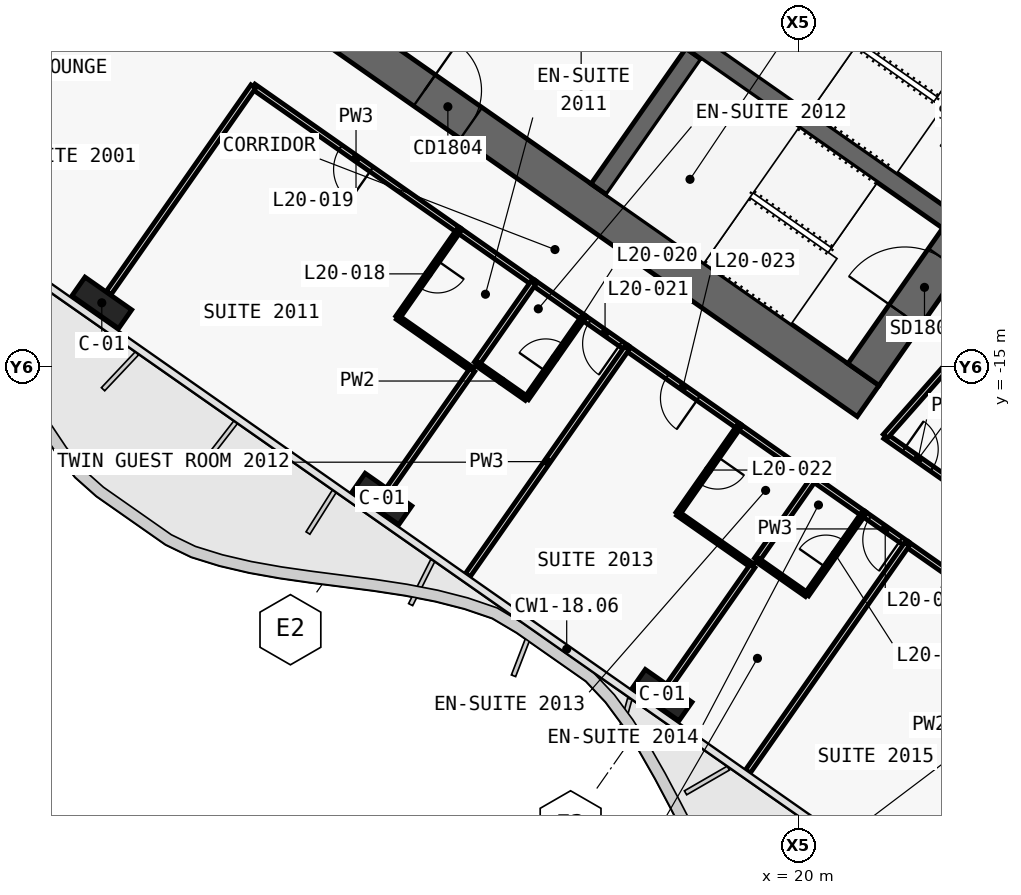
"""IFC4 building model, lengths in metres.
Left out: names, types, materials, properties, quantities, classifications, styles, units other than length and angle.
Written with IfcOpenShell. Run it as: python <this file> out.ifc"""

import sys

from ifc_helpers import new_model, si_unit, direction, frame, frame_2d, origin, origin_2d, place, context, subcontext, project, spatial, polyline, rectangle, outline, extrude, element, fill, save


model = new_model("IFC4")
c1 = context("Model", 3, precision=1e-05, world=origin(), true_north=direction((0.0, 1.0)))
c2 = subcontext(c1, "Body", "Model", "MODEL_VIEW")
j1 = project(units=[si_unit("LENGTHUNIT", "METRE"), si_unit("PLANEANGLEUNIT", "RADIAN")], contexts=[c1])
p1 = place(None, origin())
s1 = spatial("IfcSite", under=j1, at=p1, CompositionType="ELEMENT")
p2 = place(p1, origin())
s2 = spatial("IfcBuilding", under=s1, at=p2, CompositionType="ELEMENT")
p3 = place(p2, frame((0.0, 0.0, 97.7)))
s3 = spatial("IfcBuildingStorey", under=s2, at=p3, CompositionType="ELEMENT", Elevation=97.7)
p4 = place(p3, frame((-0.037, 11.867, 0.0), z_axis=(0.0, 0.0, 1.0), x_axis=(0.819155306259, -0.573571777746, 0.0)))
e1 = element("IfcWall", 1, at=p4, inside=s3, PredefinedType="SHEAR", context=c2, shape_type="SweptSolid", body=[
    extrude(outline(polyline([(33.837, 0.5), (0.0, 0.5), (0.7, -0.5), (33.837, -0.5), (33.837, 0.5)])), origin(), (0.0, 0.0, 1.0), 3.6),
])
p5 = place(p3, frame((-0.037, -0.585, 0.0), z_axis=(0.0, 0.0, 1.0), x_axis=(0.819157152511, -0.573569140985, 0.0)))
e2 = element("IfcWall", 2, at=p5, inside=s3, PredefinedType="SHEAR", context=c2, shape_type="SweptSolid", body=[
    extrude(outline(polyline([(26.695, 0.5), (0.0, 0.5), (0.7, -0.5), (26.695, -0.5), (26.695, 0.5)])), origin(), (0.0, 0.0, 1.0), 3.6),
])
p6 = place(p5, frame((1.245, 0.0, 0.0)))
e3 = element("IfcOpeningElement", 3, at=p6, cuts=e2, PredefinedType="OPENING", context=c2, shape_type="SweptSolid", body=[
    extrude(rectangle(XDim=1.5, YDim=2.1, at=frame_2d((0.75, 1.05))), frame((0.0, 0.51, 0.0), z_axis=(0.0, -1.0, 0.0), x_axis=(1.0, 0.0, 0.0)), (0.0, 0.0, 1.0), 1.02),
])
p7 = place(p5, frame((12.445, 0.0, 0.0)))
e4 = element("IfcOpeningElement", 4, at=p7, cuts=e2, PredefinedType="OPENING", context=c2, shape_type="SweptSolid", body=[
    extrude(rectangle(XDim=1.5, YDim=2.1, at=frame_2d((0.75, 1.05))), frame((0.0, 0.51, 0.0), z_axis=(0.0, -1.0, 0.0), x_axis=(1.0, 0.0, 0.0)), (0.0, 0.0, 1.0), 1.02),
])
p8 = place(p3, frame((21.708, -15.2, 0.0), z_axis=(0.0, 0.0, 1.0), x_axis=(0.573576324356, 0.819152122709, 0.0)))
e5 = element("IfcWall", 5, at=p8, inside=s3, PredefinedType="SHEAR", context=c2, shape_type="SweptSolid", body=[
    extrude(outline(polyline([(9.2, 0.5), (0.0, 0.5), (0.0, -0.5), (9.2, -0.5), (9.2, 0.5)])), origin(), (0.0, 0.0, 1.0), 3.6),
])
p9 = place(p8, frame((6.1, 0.0, 0.0)))
e6 = element("IfcOpeningElement", 6, at=p9, cuts=e5, PredefinedType="OPENING", context=c2, shape_type="SweptSolid", body=[
    extrude(rectangle(XDim=1.8, YDim=2.1, at=frame_2d((0.9, 1.05))), frame((0.0, 0.51, 0.0), z_axis=(0.0, -1.0, 0.0), x_axis=(1.0, 0.0, 0.0)), (0.0, 0.0, 1.0), 1.02),
])
p10 = place(p8, frame((1.9, 0.0, 0.0)))
e7 = element("IfcOpeningElement", 7, at=p10, cuts=e5, PredefinedType="OPENING", context=c2, shape_type="SweptSolid", body=[
    extrude(rectangle(XDim=1.8, YDim=2.1, at=frame_2d((0.9, 1.05))), frame((0.0, 0.51, 0.0), z_axis=(0.0, -1.0, 0.0), x_axis=(1.0, 0.0, 0.0)), (0.0, 0.0, 1.0), 1.02),
])
p11 = place(p3, frame((14.745, -10.324, 0.0), z_axis=(0.0, 0.0, 1.0), x_axis=(0.57356780395, 0.819158088694, 0.0)))
e8 = element("IfcWall", 8, at=p11, inside=s3, PredefinedType="SHEAR", context=c2, shape_type="SweptSolid", body=[
    extrude(outline(polyline([(0.0, 0.25), (0.0, -0.25), (4.35, -0.25), (4.35, 0.25), (0.0, 0.25)])), origin(), (0.0, 0.0, 1.0), 3.6),
])
p12 = place(p3, frame((2.638, 3.768, 0.0), z_axis=(0.0, 0.0, 1.0), x_axis=(0.819148977158, -0.573580816643, 0.0)))
e9 = element("IfcWall", 9, at=p12, inside=s3, PredefinedType="SHEAR", context=c2, shape_type="SweptSolid", body=[
    extrude(outline(polyline([(0.0, 0.25), (0.0, -0.25), (26.0, -0.25), (26.0, 0.25), (0.0, 0.25)])), origin(), (0.0, 0.0, 1.0), 3.6),
])
p13 = place(p12, frame((9.637, 0.0, 0.0)))
e10 = element("IfcOpeningElement", 10, at=p13, cuts=e9, PredefinedType="OPENING", context=c2, shape_type="SweptSolid", body=[
    extrude(rectangle(XDim=1.2, YDim=2.1, at=frame_2d((0.6, 1.05))), frame((0.0, 0.26, 0.0), z_axis=(0.0, -1.0, 0.0), x_axis=(1.0, 0.0, 0.0)), (0.0, 0.0, 1.0), 0.52),
])
p14 = place(p12, frame((11.812, 0.0, 0.0)))
e11 = element("IfcOpeningElement", 11, at=p14, cuts=e9, PredefinedType="OPENING", context=c2, shape_type="SweptSolid", body=[
    extrude(rectangle(XDim=1.2, YDim=2.1, at=frame_2d((0.6, 1.05))), frame((0.0, 0.26, 0.0), z_axis=(0.0, -1.0, 0.0), x_axis=(1.0, 0.0, 0.0)), (0.0, 0.0, 1.0), 0.52),
])
p15 = place(p12, frame((13.988, 0.0, 0.0)))
e12 = element("IfcOpeningElement", 12, at=p15, cuts=e9, PredefinedType="OPENING", context=c2, shape_type="SweptSolid", body=[
    extrude(rectangle(XDim=1.2, YDim=2.1, at=frame_2d((0.6, 1.05))), frame((0.0, 0.26, 0.0), z_axis=(0.0, -1.0, 0.0), x_axis=(1.0, 0.0, 0.0)), (0.0, 0.0, 1.0), 0.52),
])
p16 = place(p12, frame((16.262, 0.0, 0.0)))
e13 = element("IfcOpeningElement", 13, at=p16, cuts=e9, PredefinedType="OPENING", context=c2, shape_type="SweptSolid", body=[
    extrude(rectangle(XDim=1.0, YDim=2.1, at=frame_2d((0.5, 1.05))), frame((0.0, 0.26, 0.0), z_axis=(0.0, -1.0, 0.0), x_axis=(1.0, 0.0, 0.0)), (0.0, 0.0, 1.0), 0.52),
])
for number, where, z_axis, x_axis in (
    (14, (1.665, -13.313, 0.0), (0.0, 0.0, 1.0), (0.819, -0.574, 0.0)),
    (15, (9.038, -18.475, 0.0), (0.0, 0.0, 1.0), (0.819, -0.574, 0.0)),
    (16, (16.41, -23.637, 0.0), (0.0, 0.0, 1.0), (0.819, -0.574, 0.0)),
):
    element("IfcColumn", number, at=place(p3, frame(where, z_axis=z_axis, x_axis=x_axis)), inside=s3, PredefinedType="COLUMN", context=c2, shape_type="SweptSolid", body=[
        extrude(rectangle(XDim=1.5, YDim=0.6, at=origin_2d()), origin(), (0.0, 0.0, 1.0), 3.6),
    ])
p17 = place(p3, frame((22.284, -16.824, 0.0), z_axis=(0.0, 0.0, 1.0), x_axis=(0.819160859995, -0.573563846013, 0.0)))
e17 = element("IfcWall", 17, at=p17, inside=s3, PredefinedType="PARTITIONING", context=c2, shape_type="SweptSolid", body=[
    extrude(rectangle(XDim=2.098, YDim=0.15, at=frame_2d((1.049, 0.0))), origin(), (0.0, 0.0, 1.0), 3.32),
])
p18 = place(p17, frame((0.599, 0.0, 0.0)))
e18 = element("IfcOpeningElement", 18, at=p18, cuts=e17, PredefinedType="OPENING", context=c2, shape_type="SweptSolid", body=[
    extrude(rectangle(XDim=0.9, YDim=2.1, at=frame_2d((0.45, 1.05))), frame((0.0, 0.085, 0.0), z_axis=(0.0, -1.0, 0.0), x_axis=(1.0, 0.0, 0.0)), (0.0, 0.0, 1.0), 0.17),
])
p19 = place(p3, frame((11.059, -11.406, 0.0), z_axis=(0.0, 0.0, 1.0), x_axis=(-0.819155459934, 0.573571558274, 0.0)))
e19 = element("IfcWall", 19, at=p19, inside=s3, PredefinedType="PARTITIONING", context=c2, shape_type="SweptSolid", body=[
    extrude(rectangle(XDim=6.601, YDim=0.15, at=frame_2d((3.301, 0.0))), origin(), (0.0, 0.0, 1.0), 2.6),
])
p20 = place(p19, frame((2.801, 0.0, 0.0)))
e20 = element("IfcOpeningElement", 20, at=p20, cuts=e19, PredefinedType="OPENING", context=c2, shape_type="SweptSolid", body=[
    extrude(rectangle(XDim=1.0, YDim=2.1, at=frame_2d((0.5, 1.05))), frame((0.0, 0.085, 0.0), z_axis=(0.0, -1.0, 0.0), x_axis=(1.0, 0.0, 0.0)), (0.0, 0.0, 1.0), 0.17),
])
p21 = place(p3, frame((13.026, -12.783, 0.0), z_axis=(0.0, 0.0, 1.0), x_axis=(-0.819146032251, 0.573585022335, 0.0)))
e21 = element("IfcWall", 21, at=p21, inside=s3, PredefinedType="PARTITIONING", context=c2, shape_type="SweptSolid", body=[
    extrude(rectangle(XDim=2.404, YDim=0.15, at=frame_2d((1.202, 0.0))), origin(), (0.0, 0.0, 1.0), 2.6),
])
p22 = place(p3, frame((15.483, -14.504, 0.0), z_axis=(0.0, 0.0, 1.0), x_axis=(-0.819199220913, 0.573509055252, 0.0)))
e22 = element("IfcWall", 22, at=p22, inside=s3, PredefinedType="PARTITIONING", context=c2, shape_type="SweptSolid", body=[
    extrude(rectangle(XDim=1.403, YDim=0.15, at=frame_2d((0.702, 0.0))), origin(), (0.0, 0.0, 1.0), 3.32),
])
p23 = place(p22, frame((0.202, 0.0, 0.0)))
e23 = element("IfcOpeningElement", 23, at=p23, cuts=e22, PredefinedType="OPENING", context=c2, shape_type="SweptSolid", body=[
    extrude(rectangle(XDim=1.0, YDim=2.1, at=frame_2d((0.5, 1.05))), frame((0.0, 0.085, 0.0), z_axis=(0.0, -1.0, 0.0), x_axis=(1.0, 0.0, 0.0)), (0.0, 0.0, 1.0), 0.17),
])
p24 = place(p3, frame((14.336, -13.701, 0.0), z_axis=(0.0, 0.0, 1.0), x_axis=(-0.819138938282, 0.573595153214, 0.0)))
e24 = element("IfcWall", 24, at=p24, inside=s3, PredefinedType="PARTITIONING", context=c2, shape_type="SweptSolid", body=[
    extrude(rectangle(XDim=1.604, YDim=0.15, at=frame_2d((0.802, 0.0))), origin(), (0.0, 0.0, 1.0), 2.6),
])
p25 = place(p3, frame((18.431, -16.568, 0.0), z_axis=(0.0, 0.0, 1.0), x_axis=(-0.819145961204, 0.573585123798, 0.0)))
e25 = element("IfcWall", 25, at=p25, inside=s3, PredefinedType="PARTITIONING", context=c2, shape_type="SweptSolid", body=[
    extrude(rectangle(XDim=3.603, YDim=0.15, at=frame_2d((1.802, 0.0))), origin(), (0.0, 0.0, 1.0), 3.32),
])
p26 = place(p25, frame((1.301, 0.0, 0.0)))
e26 = element("IfcOpeningElement", 26, at=p26, cuts=e25, PredefinedType="OPENING", context=c2, shape_type="SweptSolid", body=[
    extrude(rectangle(XDim=1.0, YDim=2.1, at=frame_2d((0.5, 1.05))), frame((0.0, 0.085, 0.0), z_axis=(0.0, -1.0, 0.0), x_axis=(1.0, 0.0, 0.0)), (0.0, 0.0, 1.0), 0.17),
])
p27 = place(p3, frame((20.398, -17.945, 0.0), z_axis=(0.0, 0.0, 1.0), x_axis=(-0.819146032251, 0.573585022335, 0.0)))
e27 = element("IfcWall", 27, at=p27, inside=s3, PredefinedType="PARTITIONING", context=c2, shape_type="SweptSolid", body=[
    extrude(rectangle(XDim=2.404, YDim=0.15, at=frame_2d((1.202, 0.0))), origin(), (0.0, 0.0, 1.0), 2.6),
])
p28 = place(p3, frame((22.855, -19.666, 0.0), z_axis=(0.0, 0.0, 1.0), x_axis=(-0.819060210533, 0.573707566205, 0.0)))
e28 = element("IfcWall", 28, at=p28, inside=s3, PredefinedType="PARTITIONING", context=c2, shape_type="SweptSolid", body=[
    extrude(rectangle(XDim=1.403, YDim=0.15, at=frame_2d((0.702, 0.0))), origin(), (0.0, 0.0, 1.0), 3.32),
])
p29 = place(p28, frame((0.202, 0.0, 0.0)))
e29 = element("IfcOpeningElement", 29, at=p29, cuts=e28, PredefinedType="OPENING", context=c2, shape_type="SweptSolid", body=[
    extrude(rectangle(XDim=1.0, YDim=2.1, at=frame_2d((0.5, 1.05))), frame((0.0, 0.085, 0.0), z_axis=(0.0, -1.0, 0.0), x_axis=(1.0, 0.0, 0.0)), (0.0, 0.0, 1.0), 0.17),
])
p30 = place(p3, frame((21.709, -18.863, 0.0), z_axis=(0.0, 0.0, 1.0), x_axis=(-0.819189013667, 0.573523634986, 0.0)))
e30 = element("IfcWall", 30, at=p30, inside=s3, PredefinedType="PARTITIONING", context=c2, shape_type="SweptSolid", body=[
    extrude(rectangle(XDim=1.604, YDim=0.15, at=frame_2d((0.802, 0.0))), origin(), (0.0, 0.0, 1.0), 2.6),
])
p31 = place(p3, frame((25.804, -21.73, 0.0), z_axis=(0.0, 0.0, 1.0), x_axis=(-0.819145961204, 0.573585123798, 0.0)))
e31 = element("IfcWall", 31, at=p31, inside=s3, PredefinedType="PARTITIONING", context=c2, shape_type="SweptSolid", body=[
    extrude(rectangle(XDim=3.603, YDim=0.15, at=frame_2d((1.802, 0.0))), origin(), (0.0, 0.0, 1.0), 3.32),
])
p32 = place(p31, frame((1.301, 0.0, 0.0)))
e32 = element("IfcOpeningElement", 32, at=p32, cuts=e31, PredefinedType="OPENING", context=c2, shape_type="SweptSolid", body=[
    extrude(rectangle(XDim=1.0, YDim=2.1, at=frame_2d((0.5, 1.05))), frame((0.0, 0.085, 0.0), z_axis=(0.0, -1.0, 0.0), x_axis=(1.0, 0.0, 0.0)), (0.0, 0.0, 1.0), 0.17),
])
p33 = place(p3, frame((22.285, -16.825, 0.0), z_axis=(0.0, 0.0, 1.0), x_axis=(0.661551268245, 0.749899939647, 0.0)))
e33 = element("IfcWall", 33, at=p33, inside=s3, PredefinedType="PARTITIONING", context=c2, shape_type="SweptSolid", body=[
    extrude(rectangle(XDim=6.541, YDim=0.15, at=frame_2d((3.271, 0.0))), origin(), (0.0, 0.0, 1.0), 2.6),
])
p34 = place(p3, frame((11.057, -11.405, 0.0), z_axis=(0.0, 0.0, 1.0), x_axis=(-0.573591086599, -0.819141785879, 0.0)))
e34 = element("IfcWall", 34, at=p34, inside=s3, PredefinedType="PARTITIONING", context=c2, shape_type="SweptSolid", body=[
    extrude(rectangle(XDim=2.8, YDim=0.12, at=frame_2d((1.4, 0.0))), origin(), (0.0, 0.0, 1.0), 3.32),
])
p35 = place(p34, frame((0.975, 0.0, 0.0)))
e35 = element("IfcOpeningElement", 35, at=p35, cuts=e34, PredefinedType="OPENING", context=c2, shape_type="SweptSolid", body=[
    extrude(rectangle(XDim=0.85, YDim=2.05, at=frame_2d((0.425, 1.025))), frame((0.0, 0.07, 0.0), z_axis=(0.0, -1.0, 0.0), x_axis=(1.0, 0.0, 0.0)), (0.0, 0.0, 1.0), 0.14),
])
p36 = place(p3, frame((9.451, -13.7, 0.0), z_axis=(0.0, 0.0, 1.0), x_axis=(0.819141114317, -0.573592045652, 0.0)))
e36 = element("IfcWall", 36, at=p36, inside=s3, PredefinedType="PARTITIONING", context=c2, shape_type="SweptSolid", body=[
    extrude(rectangle(XDim=2.4, YDim=0.12, at=frame_2d((1.2, 0.0))), origin(), (0.0, 0.0, 1.0), 2.6),
])
p37 = place(p3, frame((11.417, -15.076, 0.0), z_axis=(0.0, 0.0, 1.0), x_axis=(-0.573594994199, -0.819139049631, 0.0)))
e37 = element("IfcWall", 37, at=p37, inside=s3, PredefinedType="PARTITIONING", context=c2, shape_type="SweptSolid", body=[
    extrude(rectangle(XDim=3.829, YDim=0.15, at=frame_2d((1.915, 0.0))), origin(), (0.0, 0.0, 1.0), 2.6),
])
p38 = place(p3, frame((1.849, -13.051, 0.0), z_axis=(0.0, 0.0, 1.0), x_axis=(0.57357355307, 0.819154063177, 0.0)))
e38 = element("IfcWall", 38, at=p38, inside=s3, PredefinedType="PARTITIONING", context=c2, shape_type="SweptSolid", body=[
    extrude(rectangle(XDim=6.63, YDim=0.15, at=frame_2d((3.315, 0.0))), origin(), (0.0, 0.0, 1.0), 2.6),
])
p39 = place(p3, frame((13.024, -12.782, 0.0), z_axis=(0.0, 0.0, 1.0), x_axis=(-0.573544201094, -0.819174614714, 0.0)))
e39 = element("IfcWall", 39, at=p39, inside=s3, PredefinedType="PARTITIONING", context=c2, shape_type="SweptSolid", body=[
    extrude(rectangle(XDim=2.602, YDim=0.15, at=frame_2d((1.301, 0.0))), origin(), (0.0, 0.0, 1.0), 2.6),
])
p40 = place(p3, frame((11.532, -14.912, 0.0), z_axis=(0.0, 0.0, 1.0), x_axis=(0.81918174131, -0.573534022273, 0.0)))
e40 = element("IfcWall", 40, at=p40, inside=s3, PredefinedType="PARTITIONING", context=c2, shape_type="SweptSolid", body=[
    extrude(rectangle(XDim=1.6, YDim=0.12, at=frame_2d((0.8, 0.0))), origin(), (0.0, 0.0, 1.0), 2.6),
])
p41 = place(p3, frame((12.844, -15.83, 0.0), z_axis=(0.0, 0.0, 1.0), x_axis=(0.573582085028, 0.819148089014, 0.0)))
e41 = element("IfcWall", 41, at=p41, inside=s3, PredefinedType="PARTITIONING", context=c2, shape_type="SweptSolid", body=[
    extrude(rectangle(XDim=2.6, YDim=0.12, at=frame_2d((1.3, 0.0))), origin(), (0.0, 0.0, 1.0), 3.32),
])
p42 = place(p41, frame((0.875, 0.0, 0.0)))
e42 = element("IfcOpeningElement", 42, at=p42, cuts=e41, PredefinedType="OPENING", context=c2, shape_type="SweptSolid", body=[
    extrude(rectangle(XDim=0.85, YDim=2.05, at=frame_2d((0.425, 1.025))), frame((0.0, 0.07, 0.0), z_axis=(0.0, -1.0, 0.0), x_axis=(1.0, 0.0, 0.0)), (0.0, 0.0, 1.0), 0.14),
])
p43 = place(p3, frame((15.481, -14.503, 0.0), z_axis=(0.0, 0.0, 1.0), x_axis=(-0.573572324301, -0.819154923562, 0.0)))
e43 = element("IfcWall", 43, at=p43, inside=s3, PredefinedType="PARTITIONING", context=c2, shape_type="SweptSolid", body=[
    extrude(rectangle(XDim=7.3, YDim=0.15, at=frame_2d((3.65, 0.0))), origin(), (0.0, 0.0, 1.0), 2.5),
])
p44 = place(p3, frame((18.43, -16.567, 0.0), z_axis=(0.0, 0.0, 1.0), x_axis=(-0.573608623498, -0.819129505664, 0.0)))
e44 = element("IfcWall", 44, at=p44, inside=s3, PredefinedType="PARTITIONING", context=c2, shape_type="SweptSolid", body=[
    extrude(rectangle(XDim=2.8, YDim=0.12, at=frame_2d((1.4, 0.0))), origin(), (0.0, 0.0, 1.0), 3.32),
])
p45 = place(p44, frame((0.975, 0.0, 0.0)))
e45 = element("IfcOpeningElement", 45, at=p45, cuts=e44, PredefinedType="OPENING", context=c2, shape_type="SweptSolid", body=[
    extrude(rectangle(XDim=0.85, YDim=2.05, at=frame_2d((0.425, 1.025))), frame((0.0, 0.07, 0.0), z_axis=(0.0, -1.0, 0.0), x_axis=(1.0, 0.0, 0.0)), (0.0, 0.0, 1.0), 0.14),
])
p46 = place(p3, frame((16.824, -18.862, 0.0), z_axis=(0.0, 0.0, 1.0), x_axis=(0.819141114317, -0.573592045652, 0.0)))
e46 = element("IfcWall", 46, at=p46, inside=s3, PredefinedType="PARTITIONING", context=c2, shape_type="SweptSolid", body=[
    extrude(rectangle(XDim=2.4, YDim=0.12, at=frame_2d((1.2, 0.0))), origin(), (0.0, 0.0, 1.0), 2.6),
])
p47 = place(p3, frame((18.79, -20.239, 0.0), z_axis=(0.0, 0.0, 1.0), x_axis=(-0.573594994199, -0.819139049631, 0.0)))
e47 = element("IfcWall", 47, at=p47, inside=s3, PredefinedType="PARTITIONING", context=c2, shape_type="SweptSolid", body=[
    extrude(rectangle(XDim=3.829, YDim=0.15, at=frame_2d((1.915, 0.0))), origin(), (0.0, 0.0, 1.0), 2.6),
])
p48 = place(p3, frame((20.396, -17.944, 0.0), z_axis=(0.0, 0.0, 1.0), x_axis=(-0.573651240222, -0.819099660964, 0.0)))
e48 = element("IfcWall", 48, at=p48, inside=s3, PredefinedType="PARTITIONING", context=c2, shape_type="SweptSolid", body=[
    extrude(rectangle(XDim=2.602, YDim=0.15, at=frame_2d((1.301, 0.0))), origin(), (0.0, 0.0, 1.0), 2.6),
])
p49 = place(p3, frame((18.905, -20.075, 0.0), z_axis=(0.0, 0.0, 1.0), x_axis=(0.819131543282, -0.57360571371, 0.0)))
e49 = element("IfcWall", 49, at=p49, inside=s3, PredefinedType="PARTITIONING", context=c2, shape_type="SweptSolid", body=[
    extrude(rectangle(XDim=1.6, YDim=0.12, at=frame_2d((0.8, 0.0))), origin(), (0.0, 0.0, 1.0), 2.6),
])
p50 = place(p3, frame((20.217, -20.992, 0.0), z_axis=(0.0, 0.0, 1.0), x_axis=(0.573537965655, 0.819178980414, 0.0)))
e50 = element("IfcWall", 50, at=p50, inside=s3, PredefinedType="PARTITIONING", context=c2, shape_type="SweptSolid", body=[
    extrude(rectangle(XDim=2.6, YDim=0.12, at=frame_2d((1.3, 0.0))), origin(), (0.0, 0.0, 1.0), 3.32),
])
p51 = place(p50, frame((0.875, 0.0, 0.0)))
e51 = element("IfcOpeningElement", 51, at=p51, cuts=e50, PredefinedType="OPENING", context=c2, shape_type="SweptSolid", body=[
    extrude(rectangle(XDim=0.85, YDim=2.05, at=frame_2d((0.425, 1.025))), frame((0.0, 0.07, 0.0), z_axis=(0.0, -1.0, 0.0), x_axis=(1.0, 0.0, 0.0)), (0.0, 0.0, 1.0), 0.14),
])
p52 = place(p3, frame((22.854, -19.665, 0.0), z_axis=(0.0, 0.0, 1.0), x_axis=(-0.573572324301, -0.819154923562, 0.0)))
e52 = element("IfcWall", 52, at=p52, inside=s3, PredefinedType="PARTITIONING", context=c2, shape_type="SweptSolid", body=[
    extrude(rectangle(XDim=7.3, YDim=0.15, at=frame_2d((3.65, 0.0))), origin(), (0.0, 0.0, 1.0), 2.5),
])
p53 = place(p7, origin())
e53 = element("IfcDoor", 53, at=p53, inside=s3, OperationType="DOUBLE_DOOR_SINGLE_SWING", PredefinedType="DOOR", context=c2, shape_type="SweptSolid", body=[
    extrude(rectangle(XDim=1.5, YDim=2.1, at=frame_2d((0.75, 1.05))), frame((0.0, 0.025, 0.0), z_axis=(0.0, -1.0, 0.0), x_axis=(1.0, 0.0, 0.0)), (0.0, 0.0, 1.0), 0.05),
])
fill(e4, e53)
p54 = place(p10, origin())
e54 = element("IfcDoor", 54, at=p54, inside=s3, OperationType="DOUBLE_DOOR_SINGLE_SWING", PredefinedType="DOOR", context=c2, shape_type="SweptSolid", body=[
    extrude(rectangle(XDim=1.8, YDim=2.1, at=frame_2d((0.9, 1.05))), frame((0.0, 0.025, 0.0), z_axis=(0.0, -1.0, 0.0), x_axis=(1.0, 0.0, 0.0)), (0.0, 0.0, 1.0), 0.05),
])
fill(e7, e54)
p55 = place(p35, origin())
e55 = element("IfcDoor", 55, at=p55, inside=s3, OperationType="SINGLE_SWING_RIGHT", PredefinedType="DOOR", context=c2, shape_type="SweptSolid", body=[
    extrude(rectangle(XDim=0.85, YDim=2.05, at=frame_2d((0.425, 1.025))), frame((0.0, 0.025, 0.0), z_axis=(0.0, -1.0, 0.0), x_axis=(1.0, 0.0, 0.0)), (0.0, 0.0, 1.0), 0.05),
])
fill(e35, e55)
p56 = place(p20, origin())
e56 = element("IfcDoor", 56, at=p56, inside=s3, OperationType="SINGLE_SWING_RIGHT", PredefinedType="DOOR", context=c2, shape_type="SweptSolid", body=[
    extrude(rectangle(XDim=1.0, YDim=2.1, at=frame_2d((0.5, 1.05))), frame((0.0, 0.025, 0.0), z_axis=(0.0, -1.0, 0.0), x_axis=(1.0, 0.0, 0.0)), (0.0, 0.0, 1.0), 0.05),
])
fill(e20, e56)
p57 = place(p42, origin())
e57 = element("IfcDoor", 57, at=p57, inside=s3, OperationType="SINGLE_SWING_LEFT", PredefinedType="DOOR", context=c2, shape_type="SweptSolid", body=[
    extrude(rectangle(XDim=0.85, YDim=2.05, at=frame_2d((0.425, 1.025))), frame((0.0, 0.025, 0.0), z_axis=(0.0, -1.0, 0.0), x_axis=(1.0, 0.0, 0.0)), (0.0, 0.0, 1.0), 0.05),
])
fill(e42, e57)
p58 = place(p23, origin())
e58 = element("IfcDoor", 58, at=p58, inside=s3, OperationType="SINGLE_SWING_RIGHT", PredefinedType="DOOR", context=c2, shape_type="SweptSolid", body=[
    extrude(rectangle(XDim=1.0, YDim=2.1, at=frame_2d((0.5, 1.05))), frame((0.0, 0.025, 0.0), z_axis=(0.0, -1.0, 0.0), x_axis=(1.0, 0.0, 0.0)), (0.0, 0.0, 1.0), 0.05),
])
fill(e23, e58)
p59 = place(p45, origin())
e59 = element("IfcDoor", 59, at=p59, inside=s3, OperationType="SINGLE_SWING_RIGHT", PredefinedType="DOOR", context=c2, shape_type="SweptSolid", body=[
    extrude(rectangle(XDim=0.85, YDim=2.05, at=frame_2d((0.425, 1.025))), frame((0.0, 0.025, 0.0), z_axis=(0.0, -1.0, 0.0), x_axis=(1.0, 0.0, 0.0)), (0.0, 0.0, 1.0), 0.05),
])
fill(e45, e59)
p60 = place(p26, origin())
e60 = element("IfcDoor", 60, at=p60, inside=s3, OperationType="SINGLE_SWING_LEFT", PredefinedType="DOOR", context=c2, shape_type="SweptSolid", body=[
    extrude(rectangle(XDim=1.0, YDim=2.1, at=frame_2d((0.5, 1.05))), frame((0.0, 0.025, 0.0), z_axis=(0.0, -1.0, 0.0), x_axis=(1.0, 0.0, 0.0)), (0.0, 0.0, 1.0), 0.05),
])
fill(e26, e60)
p61 = place(p51, origin())
e61 = element("IfcDoor", 61, at=p61, inside=s3, OperationType="SINGLE_SWING_LEFT", PredefinedType="DOOR", context=c2, shape_type="SweptSolid", body=[
    extrude(rectangle(XDim=0.85, YDim=2.05, at=frame_2d((0.425, 1.025))), frame((0.0, 0.025, 0.0), z_axis=(0.0, -1.0, 0.0), x_axis=(1.0, 0.0, 0.0)), (0.0, 0.0, 1.0), 0.05),
])
fill(e51, e61)
p62 = place(p29, origin())
e62 = element("IfcDoor", 62, at=p62, inside=s3, OperationType="SINGLE_SWING_RIGHT", PredefinedType="DOOR", context=c2, shape_type="SweptSolid", body=[
    extrude(rectangle(XDim=1.0, YDim=2.1, at=frame_2d((0.5, 1.05))), frame((0.0, 0.025, 0.0), z_axis=(0.0, -1.0, 0.0), x_axis=(1.0, 0.0, 0.0)), (0.0, 0.0, 1.0), 0.05),
])
fill(e29, e62)
p63 = place(p18, origin())
e63 = element("IfcDoor", 63, at=p63, inside=s3, OperationType="SINGLE_SWING_RIGHT", PredefinedType="DOOR", context=c2, shape_type="SweptSolid", body=[
    extrude(rectangle(XDim=0.9, YDim=2.1, at=frame_2d((0.45, 1.05))), frame((0.0, 0.025, 0.0), z_axis=(0.0, -1.0, 0.0), x_axis=(1.0, 0.0, 0.0)), (0.0, 0.0, 1.0), 0.05),
])
fill(e18, e63)
save(model, sys.argv[1])
